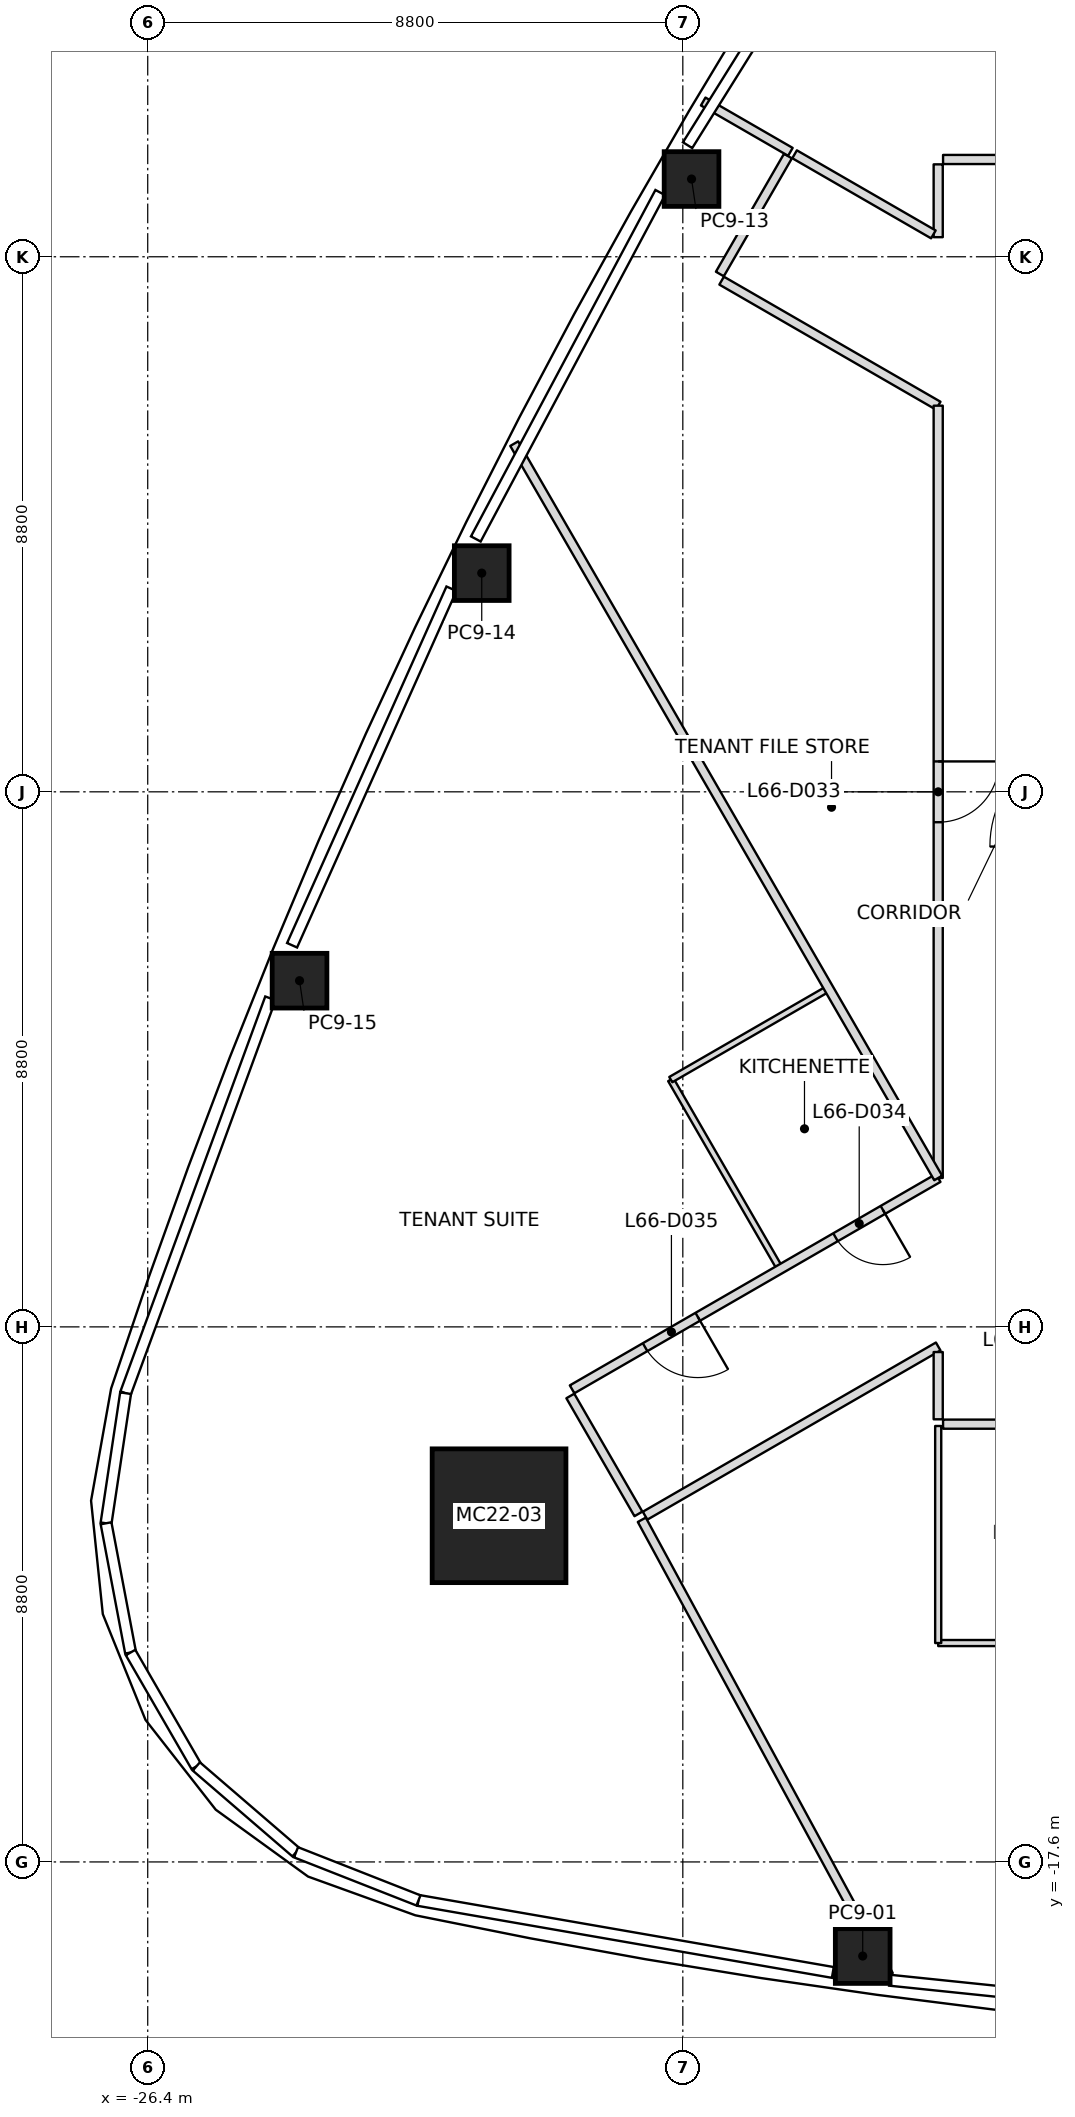
"""IFC4 building model, lengths in metres.
Left out: names, types, materials, properties, quantities, classifications, styles, units other than length and angle.
Written with IfcOpenShell. Run it as: python <this file> out.ifc"""

import sys

from ifc_helpers import new_model, si_unit, direction, frame, frame_2d, origin, origin_2d, place, context, subcontext, project, spatial, rectangle, extrude, element, fill, save


model = new_model("IFC4")
c1 = context("Model", 3, precision=1e-05, world=origin(), true_north=direction((0.0, 1.0)))
c2 = subcontext(c1, "Body", "Model", "MODEL_VIEW")
j1 = project(units=[si_unit("LENGTHUNIT", "METRE"), si_unit("PLANEANGLEUNIT", "RADIAN")], contexts=[c1])
p1 = place(None, origin())
s1 = spatial("IfcSite", under=j1, at=p1, CompositionType="ELEMENT")
p2 = place(p1, origin())
s2 = spatial("IfcBuilding", under=s1, at=p2, CompositionType="ELEMENT")
p3 = place(p2, frame((0.0, 0.0, 291.0)))
s3 = spatial("IfcBuildingStorey", under=s2, at=p3, CompositionType="ELEMENT", Elevation=291.0)
p4 = place(p3, frame((-20.622, -11.906, 0.0), z_axis=(0.027756720281, 0.01604399436, 0.999485945236), x_axis=(0.999614708015, -0.000445500311, -0.027753144871)))
e1 = element("IfcColumn", 1, at=p4, inside=s3, PredefinedType="COLUMN", context=c2, shape_type="SweptSolid", body=[
    extrude(rectangle(XDim=2.2, YDim=2.2, at=origin_2d()), origin(), (0.0, 0.0, 1.0), 4.002),
])
p5 = place(p3, frame((-14.642, -19.148, 0.0), z_axis=(0.017452456582, 0.010373837829, 0.999793876381), x_axis=(-0.99038951846, 0.137393509371, 0.015862701763)))
e2 = element("IfcColumn", 2, at=p5, inside=s3, PredefinedType="COLUMN", context=c2, shape_type="SweptSolid", body=[
    extrude(rectangle(XDim=0.9, YDim=0.9, at=origin_2d()), origin(), (0.0, 0.0, 1.0), 4.001),
])
p6 = place(p3, frame((-17.457, 10.079, 0.0), z_axis=(0.009887049298, -0.00573692984, 0.999934664812), x_axis=(0.499975560967, 0.866039512843, 2.5126546e-05)))
e3 = element("IfcColumn", 3, at=p6, inside=s3, PredefinedType="COLUMN", context=c2, shape_type="SweptSolid", body=[
    extrude(rectangle(XDim=0.9, YDim=0.9, at=origin_2d()), origin(), (0.0, 0.0, 1.0), 4.0),
])
p7 = place(p3, frame((-20.907, 3.597, 0.0), z_axis=(0.014097691364, 0.002013955909, 0.999898594398), x_axis=(0.439213591989, 0.89834703181, -0.008001940417)))
e4 = element("IfcColumn", 4, at=p7, inside=s3, PredefinedType="COLUMN", context=c2, shape_type="SweptSolid", body=[
    extrude(rectangle(XDim=0.9, YDim=0.9, at=origin_2d()), origin(), (0.0, 0.0, 1.0), 4.0),
])
p8 = place(p3, frame((-23.903, -3.106, 0.0), z_axis=(0.017696547774, 0.0099466803, 0.999793926641), x_axis=(0.376373911241, 0.926331785615, -0.015877716999)))
e5 = element("IfcColumn", 5, at=p8, inside=s3, PredefinedType="COLUMN", context=c2, shape_type="SweptSolid", body=[
    extrude(rectangle(XDim=0.9, YDim=0.9, at=origin_2d()), origin(), (0.0, 0.0, 1.0), 4.001),
])
p9 = place(p3, frame((-13.4, -6.351, 0.0), z_axis=(0.0, 0.0, 1.0), x_axis=(-0.500000781663, 0.866024952491, 0.0)))
e6 = element("IfcWall", 6, at=p9, inside=s3, PredefinedType="PARTITIONING", context=c2, shape_type="SweptSolid", body=[
    extrude(rectangle(XDim=13.946, YDim=0.15, at=frame_2d((6.973, 0.0))), origin(), (0.0, 0.0, 1.0), 3.234),
])
p10 = place(p3, frame((-18.274, -11.973, 0.0), z_axis=(0.0, 0.0, 1.0), x_axis=(0.476644065294, -0.879096374137, 0.0)))
e7 = element("IfcWall", 7, at=p10, inside=s3, PredefinedType="PARTITIONING", context=c2, shape_type="SweptSolid", body=[
    extrude(rectangle(XDim=8.52, YDim=0.15, at=frame_2d((4.26, 0.0))), origin(), (0.0, 0.0, 1.0), 3.45),
])
p11 = place(p3, frame((-15.831, 10.526, 0.0), z_axis=(0.0, 0.0, 1.0), x_axis=(-0.86604809764, 0.499960691028, 0.0)))
e8 = element("IfcWall", 8, at=p11, inside=s3, PredefinedType="PARTITIONING", context=c2, shape_type="SweptSolid", body=[
    extrude(rectangle(XDim=1.656, YDim=0.15, at=frame_2d((0.828, 0.0))), origin(), (0.0, 0.0, 1.0), 3.234),
])
p12 = place(p3, frame((-19.45, -9.936, 0.0), z_axis=(0.0, 0.0, 1.0), x_axis=(0.500030632641, -0.866007717299, 0.0)))
e9 = element("IfcWall", 9, at=p12, inside=s3, PredefinedType="PARTITIONING", context=c2, shape_type="SweptSolid", body=[
    extrude(rectangle(XDim=2.24, YDim=0.15, at=frame_2d((1.12, 0.0))), origin(), (0.0, 0.0, 1.0), 3.233),
])
p13 = place(p3, frame((-13.4, -6.351, 0.0), z_axis=(0.0, 0.0, 1.0), x_axis=(-0.8660347147, -0.499983872674, 0.0)))
e10 = element("IfcWall", 10, at=p13, inside=s3, PredefinedType="PARTITIONING", context=c2, shape_type="SweptSolid", body=[
    extrude(rectangle(XDim=6.952, YDim=0.15, at=frame_2d((3.476, 0.0))), origin(), (0.0, 0.0, 1.0), 3.317),
])
p14 = place(p13, frame((1.05, 0.0, 0.0)))
e11 = element("IfcOpeningElement", 11, at=p14, cuts=e10, PredefinedType="OPENING", context=c2, shape_type="SweptSolid", body=[
    extrude(rectangle(XDim=0.9, YDim=2.1, at=frame_2d((0.45, 1.05))), frame((0.0, 0.075, 0.0), z_axis=(0.0, -1.0, 0.0), x_axis=(1.0, 0.0, 0.0)), (0.0, 0.0, 1.0), 0.15),
])
p15 = place(p13, frame((4.566, 0.0, 0.0)))
e12 = element("IfcOpeningElement", 12, at=p15, cuts=e10, PredefinedType="OPENING", context=c2, shape_type="SweptSolid", body=[
    extrude(rectangle(XDim=1.0, YDim=2.1, at=frame_2d((0.5, 1.05))), frame((0.0, 0.075, 0.0), z_axis=(0.0, -1.0, 0.0), x_axis=(1.0, 0.0, 0.0)), (0.0, 0.0, 1.0), 0.15),
])
p16 = place(p3, frame((-18.221, -11.906, 0.0), z_axis=(0.0, 0.0, 1.0), x_axis=(0.866013219245, 0.500021103647, 0.0)))
e13 = element("IfcWall", 13, at=p16, inside=s3, PredefinedType="PARTITIONING", context=c2, shape_type="SweptSolid", body=[
    extrude(rectangle(XDim=5.567, YDim=0.15, at=frame_2d((2.783, 0.0))), origin(), (0.0, 0.0, 1.0), 3.233),
])
p17 = place(p3, frame((-13.4, -9.214, 0.0), z_axis=(0.0, 0.0, 1.0), x_axis=(0.0, -1.0, 0.0)))
e14 = element("IfcWall", 14, at=p17, inside=s3, PredefinedType="PARTITIONING", context=c2, shape_type="SweptSolid", body=[
    extrude(rectangle(XDim=1.106, YDim=0.15, at=frame_2d((0.553, 0.0))), origin(), (0.0, 0.0, 1.0), 3.233),
])
p18 = place(p3, frame((-15.871, 10.456, 0.0), z_axis=(0.0, 0.0, 1.0), x_axis=(-0.500077830873, -0.865980463445, 0.0)))
e15 = element("IfcWall", 15, at=p18, inside=s3, PredefinedType="PARTITIONING", context=c2, shape_type="SweptSolid", body=[
    extrude(rectangle(XDim=2.24, YDim=0.15, at=frame_2d((1.12, 0.0))), origin(), (0.0, 0.0, 1.0), 3.45),
])
p19 = place(p3, frame((-16.962, 8.407, 0.0), z_axis=(0.0, 0.0, 1.0), x_axis=(0.866024454709, -0.500001643842, 0.0)))
e16 = element("IfcWall", 16, at=p19, inside=s3, PredefinedType="PARTITIONING", context=c2, shape_type="SweptSolid", body=[
    extrude(rectangle(XDim=4.113, YDim=0.15, at=frame_2d((2.056, 0.0))), origin(), (0.0, 0.0, 1.0), 3.45),
])
p20 = place(p3, frame((-13.4, 6.351, 0.0), z_axis=(0.0, 0.0, 1.0), x_axis=(0.0, -1.0, 0.0)))
e17 = element("IfcWall", 17, at=p20, inside=s3, PredefinedType="PARTITIONING", context=c2, shape_type="SweptSolid", body=[
    extrude(rectangle(XDim=12.702, YDim=0.15, at=frame_2d((6.351, 0.0))), origin(), (0.0, 0.0, 1.0), 3.317),
])
p21 = place(p20, frame((5.851, 0.0, 0.0)))
e18 = element("IfcOpeningElement", 18, at=p21, cuts=e17, PredefinedType="OPENING", context=c2, shape_type="SweptSolid", body=[
    extrude(rectangle(XDim=1.0, YDim=2.1, at=frame_2d((0.5, 1.05))), frame((0.0, 0.075, 0.0), z_axis=(0.0, -1.0, 0.0), x_axis=(1.0, 0.0, 0.0)), (0.0, 0.0, 1.0), 0.15),
])
p22 = place(p3, frame((-13.4, 10.32, 0.0), z_axis=(0.0, 0.0, 1.0), x_axis=(0.0, -1.0, 0.0)))
e19 = element("IfcWall", 19, at=p22, inside=s3, PredefinedType="PARTITIONING", context=c2, shape_type="SweptSolid", body=[
    extrude(rectangle(XDim=1.198, YDim=0.15, at=frame_2d((0.599, 0.0))), origin(), (0.0, 0.0, 1.0), 3.45),
])
p23 = place(p3, frame((-13.479, 9.168, 0.0), z_axis=(0.0, 0.0, 1.0), x_axis=(-0.866051382108, 0.499955001523, 0.0)))
e20 = element("IfcWall", 20, at=p23, inside=s3, PredefinedType="PARTITIONING", context=c2, shape_type="SweptSolid", body=[
    extrude(rectangle(XDim=2.635, YDim=0.15, at=frame_2d((1.318, 0.0))), origin(), (0.0, 0.0, 1.0), 3.45),
])
p24 = place(p3, frame((-13.32, -10.4, 0.0), z_axis=(0.0, 0.0, 1.0), x_axis=(1.0, 0.0, 0.0)))
e21 = element("IfcWall", 21, at=p24, inside=s3, PredefinedType="PARTITIONING", context=c2, shape_type="SweptSolid", body=[
    extrude(rectangle(XDim=12.12, YDim=0.15, at=frame_2d((6.06, 0.0))), origin(), (0.0, 0.0, 1.0), 3.393),
])
p25 = place(p24, frame((0.97, 0.0, 0.0)))
e22 = element("IfcOpeningElement", 22, at=p25, cuts=e21, PredefinedType="OPENING", context=c2, shape_type="SweptSolid", body=[
    extrude(rectangle(XDim=0.9, YDim=2.1, at=frame_2d((0.45, 1.05))), frame((0.0, 0.075, 0.0), z_axis=(0.0, -1.0, 0.0), x_axis=(1.0, 0.0, 0.0)), (0.0, 0.0, 1.0), 0.15),
])
p26 = place(p24, frame((7.07, 0.0, 0.0)))
e23 = element("IfcOpeningElement", 23, at=p26, cuts=e21, PredefinedType="OPENING", context=c2, shape_type="SweptSolid", body=[
    extrude(rectangle(XDim=1.0, YDim=2.1, at=frame_2d((0.5, 1.05))), frame((0.0, 0.075, 0.0), z_axis=(0.0, -1.0, 0.0), x_axis=(1.0, 0.0, 0.0)), (0.0, 0.0, 1.0), 0.15),
])
p27 = place(p3, frame((-6.48, 10.4, 0.0), z_axis=(0.0, 0.0, 1.0), x_axis=(-1.0, 0.0, 0.0)))
e24 = element("IfcWall", 24, at=p27, inside=s3, PredefinedType="PARTITIONING", context=c2, shape_type="SweptSolid", body=[
    extrude(rectangle(XDim=6.84, YDim=0.15, at=frame_2d((3.42, 0.0))), origin(), (0.0, 0.0, 1.0), 3.443),
])
p28 = place(p27, frame((2.17, 0.0, 0.0)))
e25 = element("IfcOpeningElement", 25, at=p28, cuts=e24, PredefinedType="OPENING", context=c2, shape_type="SweptSolid", body=[
    extrude(rectangle(XDim=1.0, YDim=2.1, at=frame_2d((0.5, 1.05))), frame((0.0, 0.075, 0.0), z_axis=(0.0, -1.0, 0.0), x_axis=(1.0, 0.0, 0.0)), (0.0, 0.0, 1.0), 0.15),
])
p29 = place(p3, frame((-16.013, -7.825, 0.0), z_axis=(0.0, 0.0, 1.0), x_axis=(-0.499971082179, 0.866042098853, 0.0)))
e26 = element("IfcWall", 26, at=p29, inside=s3, PredefinedType="PARTITIONING", context=c2, shape_type="SweptSolid", body=[
    extrude(rectangle(XDim=3.57, YDim=0.1, at=frame_2d((1.785, 0.0))), origin(), (0.0, 0.0, 1.0), 3.45),
])
p30 = place(p3, frame((-17.798, -4.733, 0.0), z_axis=(0.0, 0.0, 1.0), x_axis=(0.866039111053, 0.499976257563, 0.0)))
e27 = element("IfcWall", 27, at=p30, inside=s3, PredefinedType="PARTITIONING", context=c2, shape_type="SweptSolid", body=[
    extrude(rectangle(XDim=2.97, YDim=0.1, at=frame_2d((1.485, 0.0))), origin(), (0.0, 0.0, 1.0), 3.317),
])
p31 = place(p3, frame((-10.4, -14.0, 0.0), z_axis=(0.0, 0.0, 1.0), x_axis=(-1.0, 0.0, 0.0)))
e28 = element("IfcWall", 28, at=p31, inside=s3, PredefinedType="PARTITIONING", context=c2, shape_type="SweptSolid", body=[
    extrude(rectangle(XDim=3.0, YDim=0.1, at=frame_2d((1.5, 0.0))), origin(), (0.0, 0.0, 1.0), 3.393),
])
p32 = place(p3, frame((-13.4, -14.0, 0.0), z_axis=(0.0, 0.0, 1.0), x_axis=(0.0, 1.0, 0.0)))
e29 = element("IfcWall", 29, at=p32, inside=s3, PredefinedType="PARTITIONING", context=c2, shape_type="SweptSolid", body=[
    extrude(rectangle(XDim=3.57, YDim=0.1, at=frame_2d((1.785, 0.0))), origin(), (0.0, 0.0, 1.0), 3.45),
])
p33 = place(p21, origin())
e30 = element("IfcDoor", 30, at=p33, inside=s3, OperationType="SINGLE_SWING_LEFT", PredefinedType="DOOR", context=c2, shape_type="SweptSolid", body=[
    extrude(rectangle(XDim=1.0, YDim=2.1, at=frame_2d((0.5, 1.05))), frame((0.0, 0.025, 0.0), z_axis=(0.0, -1.0, 0.0), x_axis=(1.0, 0.0, 0.0)), (0.0, 0.0, 1.0), 0.05),
])
fill(e18, e30)
p34 = place(p14, origin())
e31 = element("IfcDoor", 31, at=p34, inside=s3, OperationType="SINGLE_SWING_RIGHT", PredefinedType="DOOR", context=c2, shape_type="SweptSolid", body=[
    extrude(rectangle(XDim=0.9, YDim=2.1, at=frame_2d((0.45, 1.05))), frame((0.0, 0.025, 0.0), z_axis=(0.0, -1.0, 0.0), x_axis=(1.0, 0.0, 0.0)), (0.0, 0.0, 1.0), 0.05),
])
fill(e11, e31)
p35 = place(p15, origin())
e32 = element("IfcDoor", 32, at=p35, inside=s3, OperationType="SINGLE_SWING_LEFT", PredefinedType="DOOR", context=c2, shape_type="SweptSolid", body=[
    extrude(rectangle(XDim=1.0, YDim=2.1, at=frame_2d((0.5, 1.05))), frame((0.0, 0.025, 0.0), z_axis=(0.0, -1.0, 0.0), x_axis=(1.0, 0.0, 0.0)), (0.0, 0.0, 1.0), 0.05),
])
fill(e12, e32)
save(model, sys.argv[1])
